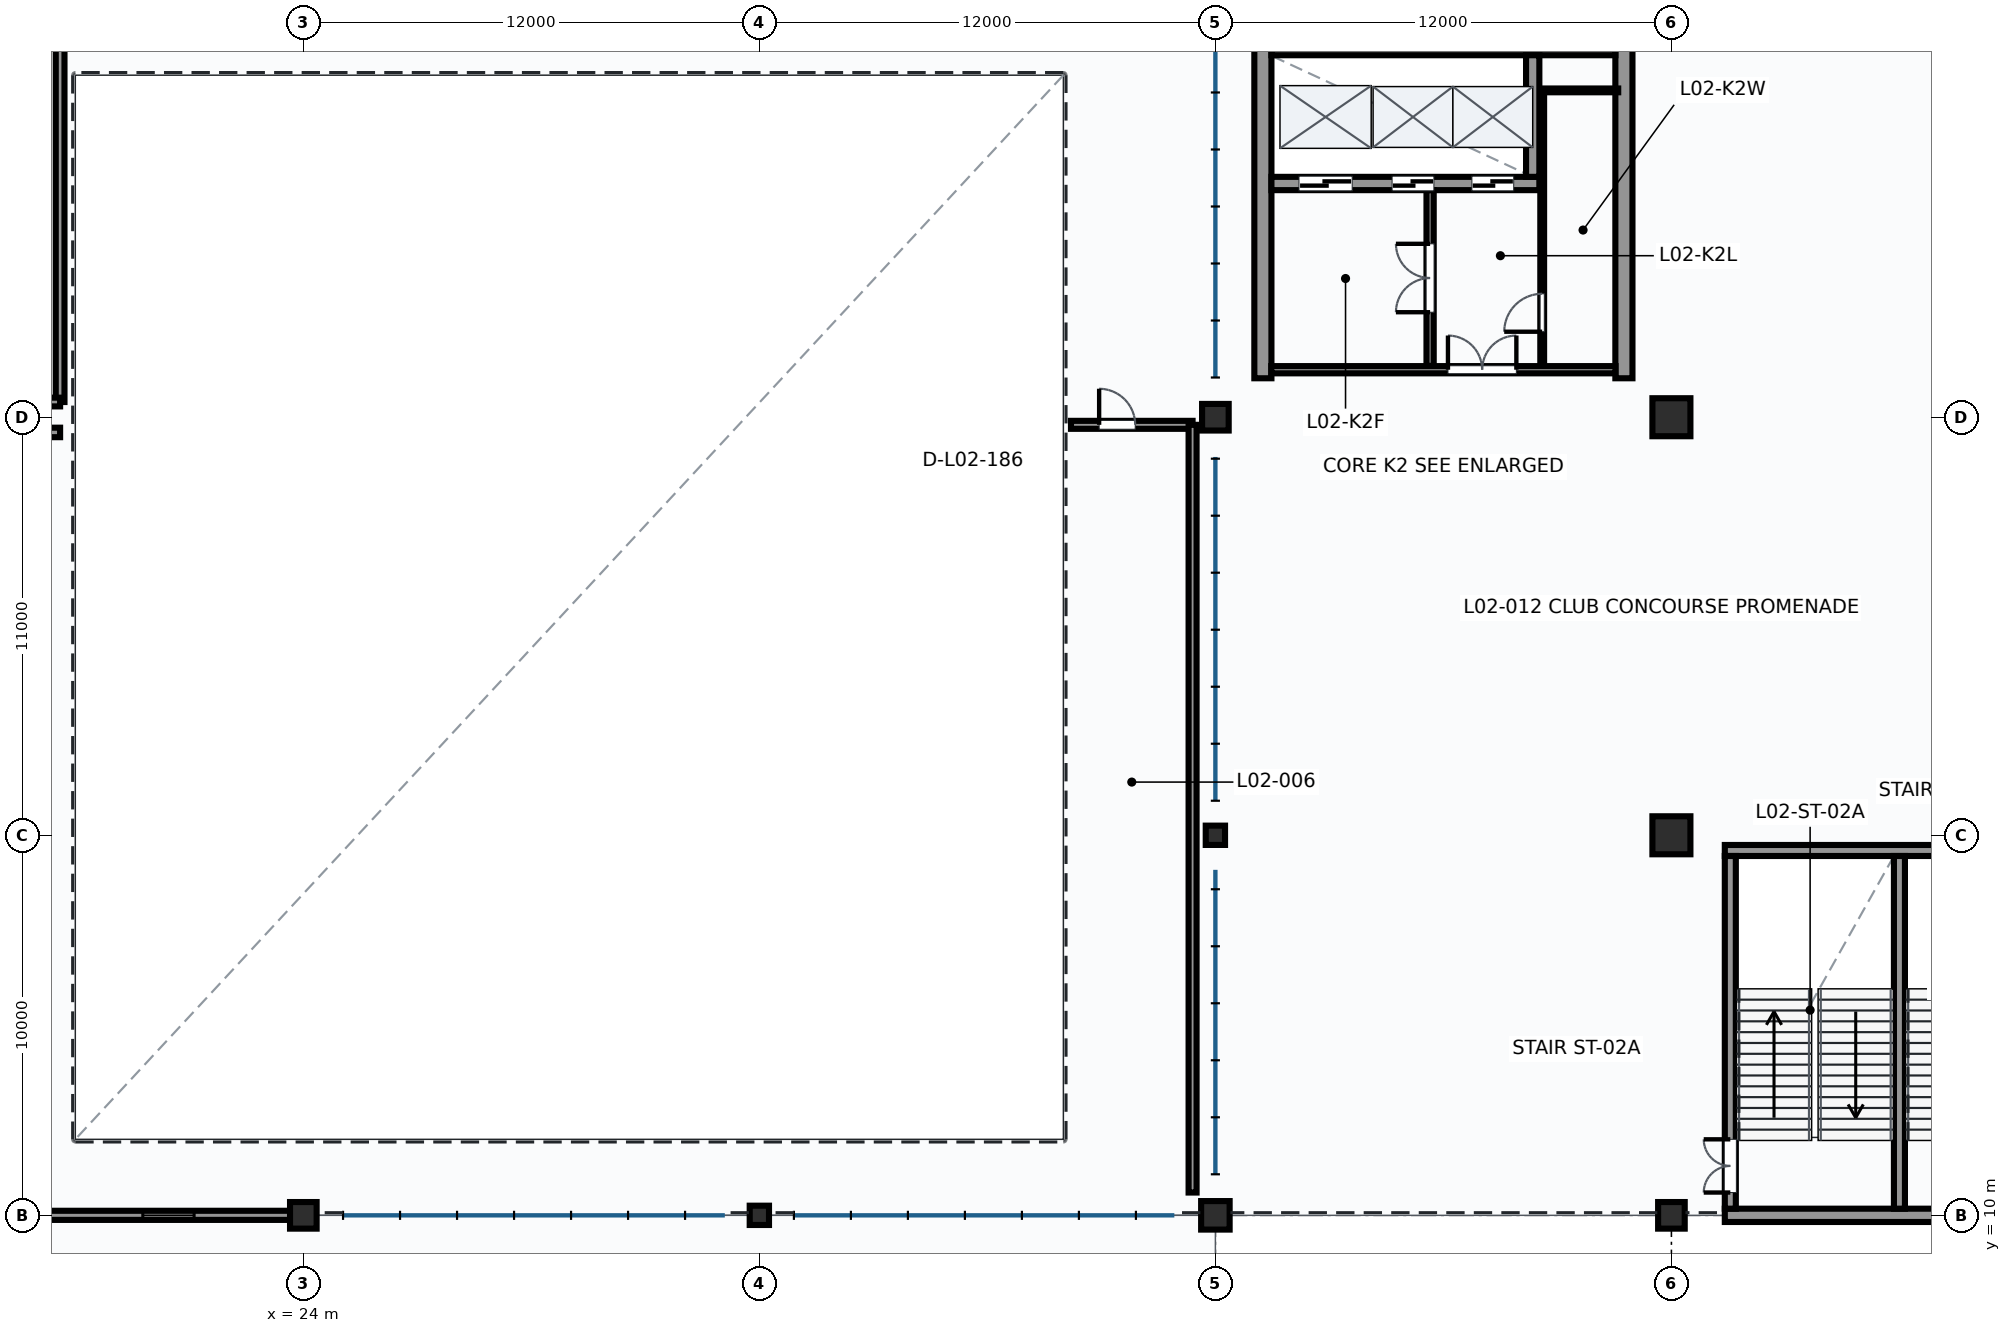
"""IFC4 building model, lengths in metres.
Left out: names, types, materials, properties, quantities, classifications, styles, units other than length and angle.
Written with IfcOpenShell. Run it as: python <this file> out.ifc"""

import sys

from ifc_helpers import new_model, si_unit, direction, frame, frame_2d, origin, origin_2d, place, context, subcontext, project, spatial, rectangle, circle, hollow_circle, extrude, element, fill, save


model = new_model("IFC4")
c1 = context("Model", 3, precision=1e-05, world=origin(), true_north=direction((0.0, 1.0)))
c2 = subcontext(c1, "Body", "Model", "MODEL_VIEW")
j1 = project(units=[si_unit("LENGTHUNIT", "METRE"), si_unit("PLANEANGLEUNIT", "RADIAN")], contexts=[c1])
p1 = place(None, origin())
s1 = spatial("IfcSite", under=j1, at=p1, CompositionType="ELEMENT")
p2 = place(p1, origin())
s2 = spatial("IfcBuilding", under=s1, at=p2, CompositionType="ELEMENT")
p3 = place(p2, frame((0.0, 0.0, 10.2)))
s3 = spatial("IfcBuildingStorey", under=s2, at=p3, CompositionType="ELEMENT", Elevation=10.2)
p4 = place(p3, frame((24.0, 10.0, 0.0), z_axis=(0.0, 0.0, 1.0), x_axis=(1.0, 0.0, 0.0)))
e1 = element("IfcColumn", 1, at=p4, inside=s3, PredefinedType="COLUMN", context=c2, shape_type="SweptSolid", body=[
    extrude(rectangle(XDim=0.7, YDim=0.7, at=origin_2d()), origin(), (0.0, 0.0, 1.0), 4.5),
])
p5 = place(p3, frame((36.0, 10.0, 0.0), z_axis=(0.0, 0.0, 1.0), x_axis=(1.0, 0.0, 0.0)))
e2 = element("IfcColumn", 2, at=p5, inside=s3, PredefinedType="COLUMN", context=c2, shape_type="SweptSolid", body=[
    extrude(hollow_circle(Radius=0.254, WallThickness=0.02, at=origin_2d()), origin(), (0.0, 0.0, 1.0), 4.5),
])
p6 = place(p3, frame((48.0, 10.0, 0.0), z_axis=(0.0, 0.0, 1.0), x_axis=(1.0, 0.0, 0.0)))
e3 = element("IfcColumn", 3, at=p6, inside=s3, PredefinedType="COLUMN", context=c2, shape_type="SweptSolid", body=[
    extrude(rectangle(XDim=0.75, YDim=0.75, at=origin_2d()), origin(), (0.0, 0.0, 1.0), 4.5),
])
p7 = place(p3, frame((48.0, 20.0, 0.0), z_axis=(0.0, 0.0, 1.0), x_axis=(1.0, 0.0, 0.0)))
e4 = element("IfcColumn", 4, at=p7, inside=s3, PredefinedType="COLUMN", context=c2, shape_type="SweptSolid", body=[
    extrude(hollow_circle(Radius=0.254, WallThickness=0.02, at=origin_2d()), origin(), (0.0, 0.0, 1.0), 4.5),
])
p8 = place(p3, frame((48.0, 31.0, 0.0), z_axis=(0.0, 0.0, 1.0), x_axis=(1.0, 0.0, 0.0)))
e5 = element("IfcColumn", 5, at=p8, inside=s3, PredefinedType="COLUMN", context=c2, shape_type="SweptSolid", body=[
    extrude(rectangle(XDim=0.7, YDim=0.7, at=origin_2d()), origin(), (0.0, 0.0, 1.0), 4.5),
])
p9 = place(p3, frame((60.0, 10.0, 0.0), z_axis=(0.0, 0.0, 1.0), x_axis=(1.0, 0.0, 0.0)))
e6 = element("IfcColumn", 6, at=p9, inside=s3, PredefinedType="COLUMN", context=c2, shape_type="SweptSolid", body=[
    extrude(circle(Radius=0.35, at=origin_2d()), origin(), (0.0, 0.0, 1.0), 4.5),
])
for number, where, z_axis, x_axis in (
    (7, (60.0, 20.0, 0.0), (0.0, 0.0, 1.0), (1.0, 0.0, 0.0)),
    (8, (60.0, 31.0, 0.0), (0.0, 0.0, 1.0), (1.0, 0.0, 0.0)),
):
    element("IfcColumn", number, at=place(p3, frame(where, z_axis=z_axis, x_axis=x_axis)), inside=s3, PredefinedType="COLUMN", context=c2, shape_type="SweptSolid", body=[
        extrude(rectangle(XDim=1.0, YDim=1.0, at=origin_2d()), origin(), (0.0, 0.0, 1.0), 4.5),
    ])
p10 = place(p3, frame((12.185, 10.0, 0.0), z_axis=(0.0, 0.0, 1.0), x_axis=(1.0, 0.0, 0.0)))
e9 = element("IfcWall", 9, at=p10, inside=s3, PredefinedType="SOLIDWALL", context=c2, shape_type="SweptSolid", body=[
    extrude(rectangle(XDim=11.48, YDim=0.24, at=frame_2d((5.74, 0.0))), origin(), (0.0, 0.0, 1.0), 3.13),
])
p11 = place(p10, frame((2.539, 0.0, 0.9)))
e10 = element("IfcOpeningElement", 10, at=p11, cuts=e9, PredefinedType="OPENING", context=c2, shape_type="SweptSolid", body=[
    extrude(rectangle(XDim=1.35, YDim=1.5, at=frame_2d((0.675, 0.75))), frame((0.0, 0.13, 0.0), z_axis=(0.0, -1.0, 0.0), x_axis=(1.0, 0.0, 0.0)), (0.0, 0.0, 1.0), 0.26),
])
p12 = place(p10, frame((7.591, 0.0, 0.9)))
e11 = element("IfcOpeningElement", 11, at=p12, cuts=e9, PredefinedType="OPENING", context=c2, shape_type="SweptSolid", body=[
    extrude(rectangle(XDim=1.35, YDim=1.8, at=frame_2d((0.675, 0.9))), frame((0.0, 0.13, 0.0), z_axis=(0.0, -1.0, 0.0), x_axis=(1.0, 0.0, 0.0)), (0.0, 0.0, 1.0), 0.26),
])
p13 = place(p3, frame((61.405, 10.0, 0.0), z_axis=(0.0, 0.0, 1.0), x_axis=(1.0, 0.0, 0.0)))
e12 = element("IfcWall", 12, at=p13, inside=s3, PredefinedType="SHEAR", context=c2, shape_type="SweptSolid", body=[
    extrude(rectangle(XDim=9.19, YDim=0.35, at=frame_2d((4.595, 0.0))), origin(), (0.0, 0.0, 1.0), 3.437),
])
p14 = place(p3, frame((61.405, 19.6, 0.0), z_axis=(0.0, 0.0, 1.0), x_axis=(1.0, 0.0, 0.0)))
e13 = element("IfcWall", 13, at=p14, inside=s3, PredefinedType="SHEAR", context=c2, shape_type="SweptSolid", body=[
    extrude(rectangle(XDim=9.19, YDim=0.29, at=frame_2d((4.595, 0.0))), origin(), (0.0, 0.0, 1.0), 4.5),
])
p15 = place(p3, frame((61.55, 10.175, 0.0), z_axis=(0.0, 0.0, 1.0), x_axis=(0.0, 1.0, 0.0)))
e14 = element("IfcWall", 14, at=p15, inside=s3, PredefinedType="SHEAR", context=c2, shape_type="SweptSolid", body=[
    extrude(rectangle(XDim=9.28, YDim=0.29, at=frame_2d((4.64, 0.0))), origin(), (0.0, 0.0, 1.0), 4.5),
])
p16 = place(p15, frame((0.425, 0.0, 0.0)))
e15 = element("IfcOpeningElement", 15, at=p16, cuts=e14, PredefinedType="OPENING", context=c2, shape_type="SweptSolid", body=[
    extrude(rectangle(XDim=1.4, YDim=2.2, at=frame_2d((0.7, 1.1))), frame((0.0, 0.155, 0.0), z_axis=(0.0, -1.0, 0.0), x_axis=(1.0, 0.0, 0.0)), (0.0, 0.0, 1.0), 0.31),
])
p17 = place(p3, frame((66.0, 10.175, 0.0), z_axis=(0.0, 0.0, 1.0), x_axis=(0.0, 1.0, 0.0)))
e16 = element("IfcWall", 16, at=p17, inside=s3, PredefinedType="SHEAR", context=c2, shape_type="SweptSolid", body=[
    extrude(rectangle(XDim=9.28, YDim=0.29, at=frame_2d((4.64, 0.0))), origin(), (0.0, 0.0, 1.0), 4.5),
])
for number, where, z_axis, x_axis in (
    (17, (49.25, 32.025, 0.0), (0.0, 0.0, 1.0), (0.0, 1.0, 0.0)),
    (18, (58.75, 32.025, 0.0), (0.0, 0.0, 1.0), (0.0, 1.0, 0.0)),
):
    element("IfcWall", number, at=place(p3, frame(where, z_axis=z_axis, x_axis=x_axis)), inside=s3, PredefinedType="SHEAR", context=c2, shape_type="SweptSolid", body=[
        extrude(rectangle(XDim=8.95, YDim=0.45, at=frame_2d((4.475, 0.0))), origin(), (0.0, 0.0, 1.0), 4.5),
    ])
p18 = place(p3, frame((49.475, 40.75, 0.0), z_axis=(0.0, 0.0, 1.0), x_axis=(1.0, 0.0, 0.0)))
e19 = element("IfcWall", 19, at=p18, inside=s3, PredefinedType="SHEAR", context=c2, shape_type="SweptSolid", body=[
    extrude(rectangle(XDim=9.05, YDim=0.45, at=frame_2d((4.525, 0.0))), origin(), (0.0, 0.0, 1.0), 4.5),
])
p19 = place(p3, frame((49.475, 37.15, 0.0), z_axis=(0.0, 0.0, 1.0), x_axis=(1.0, 0.0, 0.0)))
e20 = element("IfcWall", 20, at=p19, inside=s3, PredefinedType="SHEAR", context=c2, shape_type="SweptSolid", body=[
    extrude(rectangle(XDim=7.05, YDim=0.35, at=frame_2d((3.525, 0.0))), origin(), (0.0, 0.0, 1.0), 4.5),
])
p20 = place(p19, frame((0.725, 0.0, 0.0)))
e21 = element("IfcOpeningElement", 21, at=p20, cuts=e20, PredefinedType="OPENING", context=c2, shape_type="SweptSolid", body=[
    extrude(rectangle(XDim=1.4, YDim=2.3, at=frame_2d((0.7, 1.15))), frame((0.0, 0.185, 0.0), z_axis=(0.0, -1.0, 0.0), x_axis=(1.0, 0.0, 0.0)), (0.0, 0.0, 1.0), 0.37),
])
p21 = place(p19, frame((3.175, 0.0, 0.0)))
e22 = element("IfcOpeningElement", 22, at=p21, cuts=e20, PredefinedType="OPENING", context=c2, shape_type="SweptSolid", body=[
    extrude(rectangle(XDim=1.1, YDim=2.2, at=frame_2d((0.55, 1.1))), frame((0.0, 0.185, 0.0), z_axis=(0.0, -1.0, 0.0), x_axis=(1.0, 0.0, 0.0)), (0.0, 0.0, 1.0), 0.37),
])
p22 = place(p19, frame((5.275, 0.0, 0.0)))
e23 = element("IfcOpeningElement", 23, at=p22, cuts=e20, PredefinedType="OPENING", context=c2, shape_type="SweptSolid", body=[
    extrude(rectangle(XDim=1.1, YDim=2.2, at=frame_2d((0.55, 1.1))), frame((0.0, 0.185, 0.0), z_axis=(0.0, -1.0, 0.0), x_axis=(1.0, 0.0, 0.0)), (0.0, 0.0, 1.0), 0.37),
])
p23 = place(p3, frame((56.35, 37.325, 0.0), z_axis=(0.0, 0.0, 1.0), x_axis=(0.0, 1.0, 0.0)))
e24 = element("IfcWall", 24, at=p23, inside=s3, PredefinedType="SHEAR", context=c2, shape_type="SweptSolid", body=[
    extrude(rectangle(XDim=3.2, YDim=0.35, at=frame_2d((1.6, 0.0))), origin(), (0.0, 0.0, 1.0), 4.5),
])
p24 = place(p3, frame((49.47, 32.25, 0.0), z_axis=(0.0, 0.0, 1.0), x_axis=(1.0, 0.0, 0.0)))
e25 = element("IfcWall", 25, at=p24, inside=s3, PredefinedType="PARTITIONING", context=c2, shape_type="SweptSolid", body=[
    extrude(rectangle(XDim=9.06, YDim=0.19, at=frame_2d((4.53, 0.0))), origin(), (0.0, 0.0, 1.0), 4.15),
])
p25 = place(p24, frame((4.65, 0.0, 0.0)))
e26 = element("IfcOpeningElement", 26, at=p25, cuts=e25, PredefinedType="OPENING", context=c2, shape_type="SweptSolid", body=[
    extrude(rectangle(XDim=1.8, YDim=2.3, at=frame_2d((0.9, 1.15))), frame((0.0, 0.105, 0.0), z_axis=(0.0, -1.0, 0.0), x_axis=(1.0, 0.0, 0.0)), (0.0, 0.0, 1.0), 0.21),
])
p26 = place(p3, frame((53.65, 32.35, 0.0), z_axis=(0.0, 0.0, 1.0), x_axis=(0.0, 1.0, 0.0)))
e27 = element("IfcWall", 27, at=p26, inside=s3, PredefinedType="PARTITIONING", context=c2, shape_type="SweptSolid", body=[
    extrude(rectangle(XDim=4.625, YDim=0.19, at=frame_2d((2.312, 0.0))), origin(), (0.0, 0.0, 1.0), 4.15),
])
p27 = place(p26, frame((1.413, 0.0, 0.0)))
e28 = element("IfcOpeningElement", 28, at=p27, cuts=e27, PredefinedType="OPENING", context=c2, shape_type="SweptSolid", body=[
    extrude(rectangle(XDim=1.8, YDim=2.2, at=frame_2d((0.9, 1.1))), frame((0.0, 0.105, 0.0), z_axis=(0.0, -1.0, 0.0), x_axis=(1.0, 0.0, 0.0)), (0.0, 0.0, 1.0), 0.21),
])
p28 = place(p3, frame((56.6, 32.35, 0.0), z_axis=(0.0, 0.0, 1.0), x_axis=(0.0, 1.0, 0.0)))
e29 = element("IfcWall", 29, at=p28, inside=s3, PredefinedType="PARTITIONING", context=c2, shape_type="SweptSolid", body=[
    extrude(rectangle(XDim=7.25, YDim=0.1, at=frame_2d((3.625, 0.0))), origin(), (0.0, 0.0, 1.0), 4.15),
])
p29 = place(p28, frame((0.9, 0.0, 0.0)))
e30 = element("IfcOpeningElement", 30, at=p29, cuts=e29, PredefinedType="OPENING", context=c2, shape_type="SweptSolid", body=[
    extrude(rectangle(XDim=1.0, YDim=2.1, at=frame_2d((0.5, 1.05))), frame((0.0, 0.06, 0.0), z_axis=(0.0, -1.0, 0.0), x_axis=(1.0, 0.0, 0.0)), (0.0, 0.0, 1.0), 0.12),
])
p30 = place(p3, frame((56.6, 39.6, 0.0), z_axis=(0.0, 0.0, 1.0), x_axis=(1.0, 0.0, 0.0)))
e31 = element("IfcWall", 31, at=p30, inside=s3, PredefinedType="PARTITIONING", context=c2, shape_type="SweptSolid", body=[
    extrude(rectangle(XDim=2.0, YDim=0.1, at=frame_2d((1.0, 0.0))), origin(), (0.0, 0.0, 1.0), 4.15),
])
p31 = place(p3, frame((0.6, 30.6, 0.0), z_axis=(0.0, 0.0, 1.0), x_axis=(1.0, 0.0, 0.0)))
e32 = element("IfcWall", 32, at=p31, inside=s3, PredefinedType="SOLIDWALL", context=c2, shape_type="SweptSolid", body=[
    extrude(rectangle(XDim=17.0, YDim=0.25, at=frame_2d((8.5, 0.0))), origin(), (0.0, 0.0, 1.0), 3.28),
])
p32 = place(p31, frame((8.05, 0.0, 0.0)))
e33 = element("IfcOpeningElement", 33, at=p32, cuts=e32, PredefinedType="OPENING", context=c2, shape_type="SweptSolid", body=[
    extrude(rectangle(XDim=0.9, YDim=2.1, at=frame_2d((0.45, 1.05))), frame((0.0, 0.135, 0.0), z_axis=(0.0, -1.0, 0.0), x_axis=(1.0, 0.0, 0.0)), (0.0, 0.0, 1.0), 0.27),
])
p33 = place(p3, frame((17.6, 51.4, 0.0), z_axis=(0.0, 0.0, 1.0), x_axis=(0.0, -1.0, 0.0)))
e34 = element("IfcWall", 34, at=p33, inside=s3, PredefinedType="SOLIDWALL", context=c2, shape_type="SweptSolid", body=[
    extrude(rectangle(XDim=20.0, YDim=0.23, at=frame_2d((10.0, 0.0))), origin(), (0.0, 0.0, 1.0), 3.28),
])
p34 = place(p33, frame((9.525, 0.0, 0.0)))
e35 = element("IfcOpeningElement", 35, at=p34, cuts=e34, PredefinedType="OPENING", context=c2, shape_type="SweptSolid", body=[
    extrude(rectangle(XDim=0.95, YDim=2.15, at=frame_2d((0.475, 1.075))), frame((0.0, 0.125, 0.0), z_axis=(0.0, -1.0, 0.0), x_axis=(1.0, 0.0, 0.0)), (0.0, 0.0, 1.0), 0.25),
])
p35 = place(p3, frame((17.6, 31.4, 0.0), z_axis=(0.0, 0.0, 1.0), x_axis=(-1.0, 0.0, 0.0)))
e36 = element("IfcWall", 36, at=p35, inside=s3, PredefinedType="SOLIDWALL", context=c2, shape_type="SweptSolid", body=[
    extrude(rectangle(XDim=17.0, YDim=0.23, at=frame_2d((8.5, 0.0))), origin(), (0.0, 0.0, 1.0), 3.28),
])
p36 = place(p3, frame((44.2, 30.8, 0.0), z_axis=(0.0, 0.0, 1.0), x_axis=(1.0, 0.0, 0.0)))
e37 = element("IfcWall", 37, at=p36, inside=s3, PredefinedType="SOLIDWALL", context=c2, shape_type="SweptSolid", body=[
    extrude(rectangle(XDim=3.2, YDim=0.21, at=frame_2d((1.6, 0.0))), origin(), (0.0, 0.0, 1.0), 4.15),
])
p37 = place(p36, frame((0.741, 0.0, 0.0)))
e38 = element("IfcOpeningElement", 38, at=p37, cuts=e37, PredefinedType="OPENING", context=c2, shape_type="SweptSolid", body=[
    extrude(rectangle(XDim=0.95, YDim=2.15, at=frame_2d((0.475, 1.075))), frame((0.0, 0.115, 0.0), z_axis=(0.0, -1.0, 0.0), x_axis=(1.0, 0.0, 0.0)), (0.0, 0.0, 1.0), 0.23),
])
p38 = place(p3, frame((47.4, 30.8, 0.0), z_axis=(0.0, 0.0, 1.0), x_axis=(0.0, -1.0, 0.0)))
e39 = element("IfcWall", 39, at=p38, inside=s3, PredefinedType="SOLIDWALL", context=c2, shape_type="SweptSolid", body=[
    extrude(rectangle(XDim=20.2, YDim=0.21, at=frame_2d((10.1, 0.0))), origin(), (0.0, 0.0, 1.0), 4.15),
])
p39 = place(p12, origin())
e40 = element("IfcWindow", 40, at=p39, inside=s3, PartitioningType="SINGLE_PANEL", PredefinedType="WINDOW", context=c2, shape_type="SweptSolid", body=[
    extrude(rectangle(XDim=1.35, YDim=1.8, at=frame_2d((0.675, 0.9))), frame((0.0, 0.03, 0.0), z_axis=(0.0, -1.0, 0.0), x_axis=(1.0, 0.0, 0.0)), (0.0, 0.0, 1.0), 0.06),
])
fill(e11, e40)
p40 = place(p16, frame((1.4, 0.0, 0.0), z_axis=(0.0, 0.0, 1.0), x_axis=(-1.0, 0.0, 0.0)))
e41 = element("IfcDoor", 41, at=p40, inside=s3, OperationType="DOUBLE_DOOR_SINGLE_SWING", PredefinedType="DOOR", context=c2, shape_type="SweptSolid", body=[
    extrude(rectangle(XDim=1.4, YDim=2.2, at=frame_2d((0.7, 1.1))), frame((0.0, 0.025, 0.0), z_axis=(0.0, -1.0, 0.0), x_axis=(1.0, 0.0, 0.0)), (0.0, 0.0, 1.0), 0.05),
])
fill(e15, e41)
p41 = place(p20, origin())
e42 = element("IfcDoor", 42, at=p41, inside=s3, OperationType="SLIDING_TO_LEFT", PredefinedType="DOOR", context=c2, shape_type="SweptSolid", body=[
    extrude(rectangle(XDim=1.4, YDim=2.3, at=frame_2d((0.7, 1.15))), frame((0.0, 0.025, 0.0), z_axis=(0.0, -1.0, 0.0), x_axis=(1.0, 0.0, 0.0)), (0.0, 0.0, 1.0), 0.05),
])
fill(e21, e42)
p42 = place(p21, origin())
e43 = element("IfcDoor", 43, at=p42, inside=s3, OperationType="SLIDING_TO_LEFT", PredefinedType="DOOR", context=c2, shape_type="SweptSolid", body=[
    extrude(rectangle(XDim=1.1, YDim=2.2, at=frame_2d((0.55, 1.1))), frame((0.0, 0.025, 0.0), z_axis=(0.0, -1.0, 0.0), x_axis=(1.0, 0.0, 0.0)), (0.0, 0.0, 1.0), 0.05),
])
fill(e22, e43)
p43 = place(p22, origin())
e44 = element("IfcDoor", 44, at=p43, inside=s3, OperationType="SLIDING_TO_LEFT", PredefinedType="DOOR", context=c2, shape_type="SweptSolid", body=[
    extrude(rectangle(XDim=1.1, YDim=2.2, at=frame_2d((0.55, 1.1))), frame((0.0, 0.025, 0.0), z_axis=(0.0, -1.0, 0.0), x_axis=(1.0, 0.0, 0.0)), (0.0, 0.0, 1.0), 0.05),
])
fill(e23, e44)
p44 = place(p25, origin())
e45 = element("IfcDoor", 45, at=p44, inside=s3, OperationType="DOUBLE_DOOR_SINGLE_SWING", PredefinedType="DOOR", context=c2, shape_type="SweptSolid", body=[
    extrude(rectangle(XDim=1.8, YDim=2.3, at=frame_2d((0.9, 1.15))), frame((0.0, 0.025, 0.0), z_axis=(0.0, -1.0, 0.0), x_axis=(1.0, 0.0, 0.0)), (0.0, 0.0, 1.0), 0.05),
])
fill(e26, e45)
p45 = place(p27, origin())
e46 = element("IfcDoor", 46, at=p45, inside=s3, OperationType="DOUBLE_DOOR_SINGLE_SWING", PredefinedType="DOOR", context=c2, shape_type="SweptSolid", body=[
    extrude(rectangle(XDim=1.8, YDim=2.2, at=frame_2d((0.9, 1.1))), frame((0.0, 0.025, 0.0), z_axis=(0.0, -1.0, 0.0), x_axis=(1.0, 0.0, 0.0)), (0.0, 0.0, 1.0), 0.05),
])
fill(e28, e46)
p46 = place(p29, origin())
e47 = element("IfcDoor", 47, at=p46, inside=s3, OperationType="SINGLE_SWING_LEFT", PredefinedType="DOOR", context=c2, shape_type="SweptSolid", body=[
    extrude(rectangle(XDim=1.0, YDim=2.1, at=frame_2d((0.5, 1.05))), frame((0.0, 0.025, 0.0), z_axis=(0.0, -1.0, 0.0), x_axis=(1.0, 0.0, 0.0)), (0.0, 0.0, 1.0), 0.05),
])
fill(e30, e47)
p47 = place(p37, origin())
e48 = element("IfcDoor", 48, at=p47, inside=s3, OperationType="SINGLE_SWING_LEFT", PredefinedType="DOOR", context=c2, shape_type="SweptSolid", body=[
    extrude(rectangle(XDim=0.95, YDim=2.15, at=frame_2d((0.475, 1.075))), frame((0.0, 0.025, 0.0), z_axis=(0.0, -1.0, 0.0), x_axis=(1.0, 0.0, 0.0)), (0.0, 0.0, 1.0), 0.05),
])
fill(e38, e48)
save(model, sys.argv[1])
